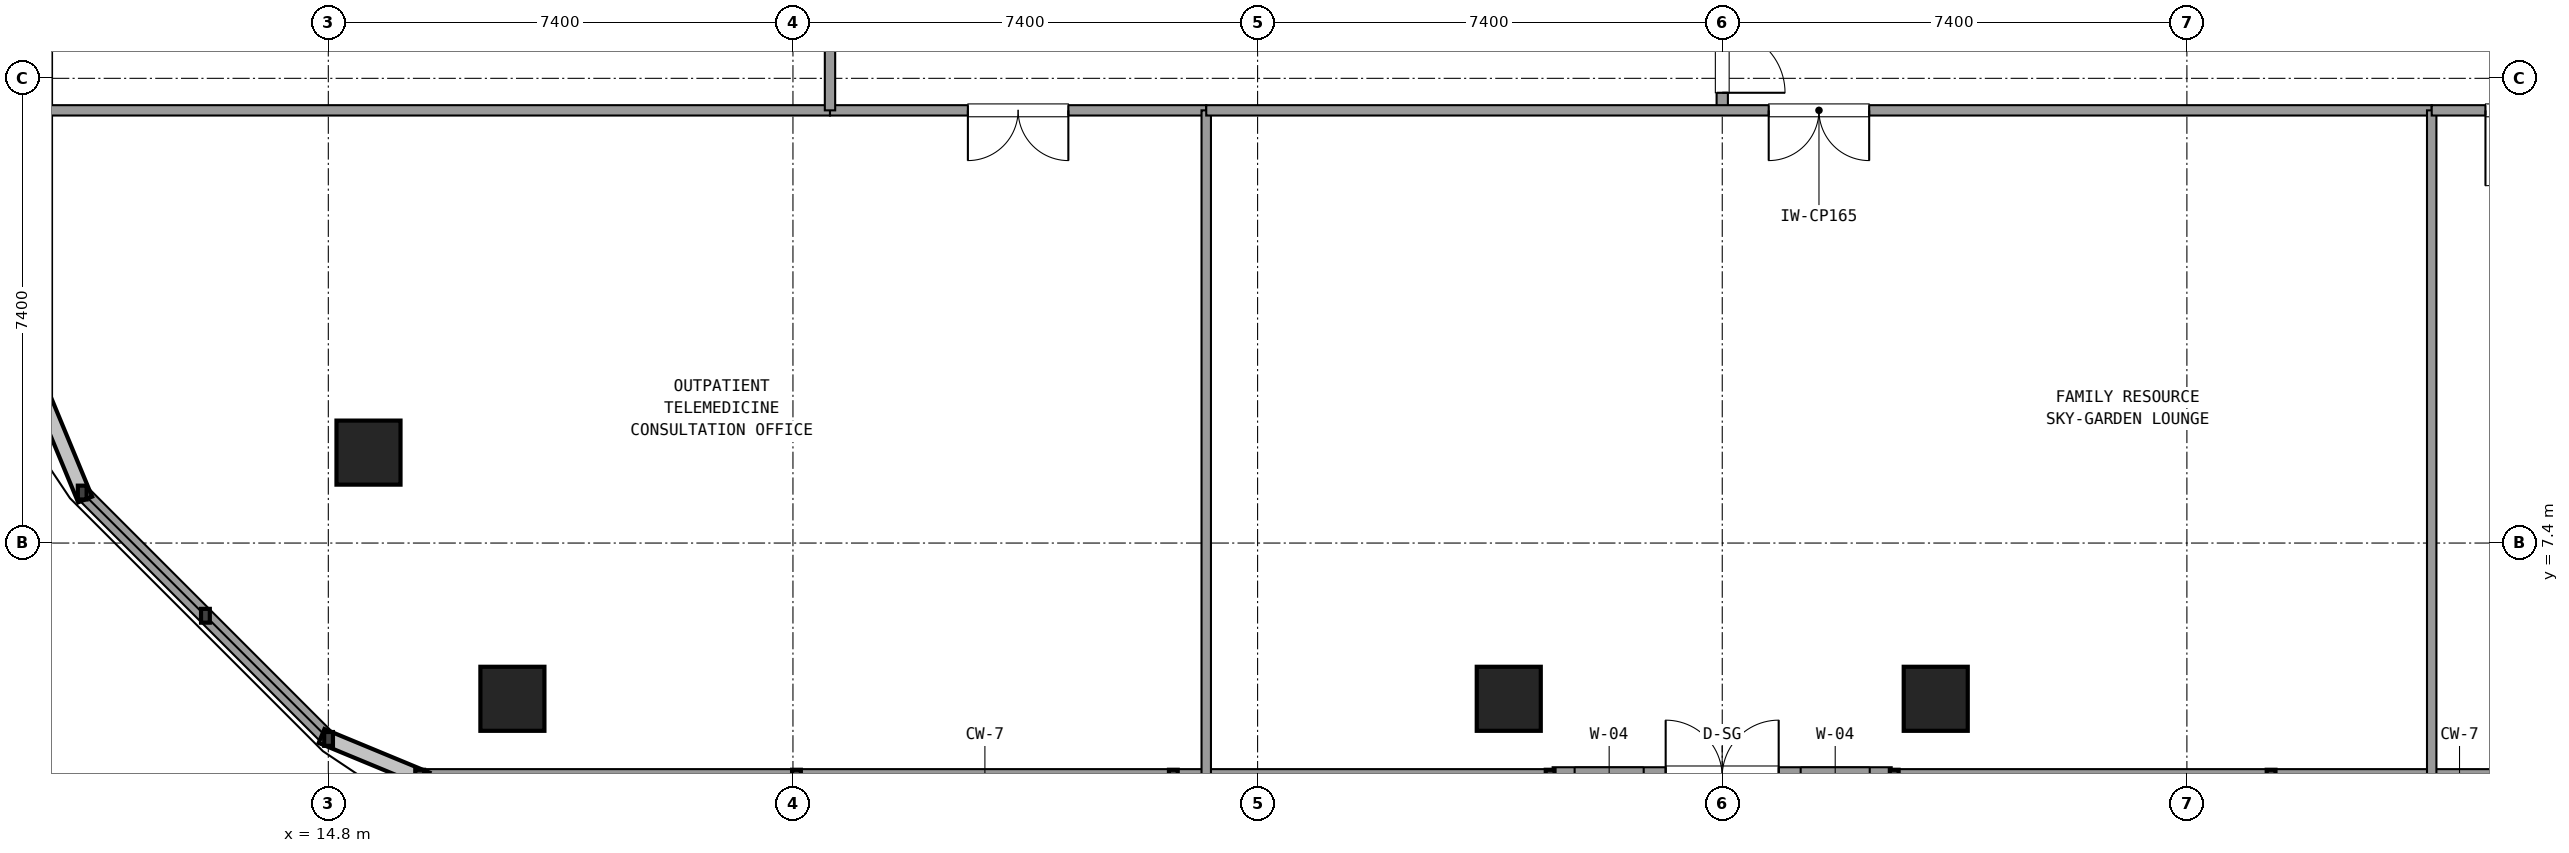
"""IFC4 building model, lengths in metres.
Left out: names, types, materials, properties, quantities, classifications, styles, units other than length and angle.
Written with IfcOpenShell. Run it as: python <this file> out.ifc"""

import sys

from ifc_helpers import new_model, si_unit, direction, frame, frame_2d, origin, origin_2d, place, context, subcontext, project, spatial, rectangle, extrude, element, fill, save


model = new_model("IFC4")
c1 = context("Model", 3, precision=1e-05, world=origin(), true_north=direction((0.0, 1.0)))
c2 = subcontext(c1, "Body", "Model", "MODEL_VIEW")
j1 = project(units=[si_unit("LENGTHUNIT", "METRE"), si_unit("PLANEANGLEUNIT", "RADIAN")], contexts=[c1])
p1 = place(None, origin())
s1 = spatial("IfcSite", under=j1, at=p1, CompositionType="ELEMENT")
p2 = place(p1, origin())
s2 = spatial("IfcBuilding", under=s1, at=p2, CompositionType="ELEMENT")
p3 = place(p2, frame((0.0, 0.0, 75.42)))
s3 = spatial("IfcBuildingStorey", under=s2, at=p3, CompositionType="ELEMENT", Elevation=75.42)
for number, where, z_axis, x_axis in (
    (1, (15.44, 8.84, 0.0), (0.0, 0.0, 1.0), (1.0, 0.0, 0.0)),
    (2, (17.732, 4.92, 0.0), (0.0, 0.0, 1.0), (1.0, 0.0, 0.0)),
    (3, (33.6, 4.92, 0.0), (0.0, 0.0, 1.0), (1.0, 0.0, 0.0)),
    (4, (40.4, 4.92, 0.0), (0.0, 0.0, 1.0), (1.0, 0.0, 0.0)),
):
    element("IfcColumn", number, at=place(p3, frame(where, z_axis=z_axis, x_axis=x_axis)), inside=s3, PredefinedType="COLUMN", context=c2, shape_type="SweptSolid", body=[
        extrude(rectangle(XDim=1.02, YDim=1.02, at=origin_2d()), origin(), (0.0, 0.0, 1.0), 5.76),
    ])
p4 = place(p3, frame((34.299, 3.68, 0.0), z_axis=(0.0, 0.0, 1.0), x_axis=(1.0, 0.0, 0.0)))
e5 = element("IfcWall", 5, at=p4, inside=s3, PredefinedType="SOLIDWALL", context=c2, shape_type="SweptSolid", body=[
    extrude(rectangle(XDim=5.4, YDim=0.3, at=frame_2d((2.7, 0.0))), origin(), (0.0, 0.0, 1.0), 4.83),
])
p5 = place(p4, frame((1.8, 0.0, 0.0)))
e6 = element("IfcOpeningElement", 6, at=p5, cuts=e5, PredefinedType="OPENING", context=c2, shape_type="SweptSolid", body=[
    extrude(rectangle(XDim=1.8, YDim=2.25, at=frame_2d((0.9, 1.125))), frame((0.0, 0.16, 0.0), z_axis=(0.0, -1.0, 0.0), x_axis=(1.0, 0.0, 0.0)), (0.0, 0.0, 1.0), 0.32),
])
p6 = place(p4, frame((0.35, 0.0, 0.4)))
e7 = element("IfcOpeningElement", 7, at=p6, cuts=e5, PredefinedType="OPENING", context=c2, shape_type="SweptSolid", body=[
    extrude(rectangle(XDim=1.1, YDim=1.8, at=frame_2d((0.55, 0.9))), frame((0.0, 0.16, 0.0), z_axis=(0.0, -1.0, 0.0), x_axis=(1.0, 0.0, 0.0)), (0.0, 0.0, 1.0), 0.32),
])
p7 = place(p4, frame((3.95, 0.0, 0.4)))
e8 = element("IfcOpeningElement", 8, at=p7, cuts=e5, PredefinedType="OPENING", context=c2, shape_type="SweptSolid", body=[
    extrude(rectangle(XDim=1.1, YDim=1.8, at=frame_2d((0.55, 0.9))), frame((0.0, 0.16, 0.0), z_axis=(0.0, -1.0, 0.0), x_axis=(1.0, 0.0, 0.0)), (0.0, 0.0, 1.0), 0.32),
])
p8 = place(p3, frame((16.255, 3.68, 0.0), z_axis=(0.0, 0.0, 1.0), x_axis=(1.0, 0.0, 0.0)))
e9 = element("IfcWall", 9, at=p8, inside=s3, PredefinedType="SOLIDWALL", context=c2, shape_type="SweptSolid", body=[
    extrude(rectangle(XDim=18.004, YDim=0.24, at=frame_2d((9.002, 0.0))), origin(), (0.0, 0.0, 1.0), 0.85),
])
p9 = place(p3, frame((39.739, 3.68, 0.0), z_axis=(0.0, 0.0, 1.0), x_axis=(1.0, 0.0, 0.0)))
e10 = element("IfcWall", 10, at=p9, inside=s3, PredefinedType="SOLIDWALL", context=c2, shape_type="SweptSolid", body=[
    extrude(rectangle(XDim=18.006, YDim=0.24, at=frame_2d((9.003, 0.0))), origin(), (0.0, 0.0, 1.0), 0.85),
])
p10 = place(p3, frame((10.28, 23.161, 0.0), z_axis=(0.0, 0.0, 1.0), x_axis=(0.0, -1.0, 0.0)))
e11 = element("IfcWall", 11, at=p10, inside=s3, PredefinedType="SOLIDWALL", context=c2, shape_type="SweptSolid", body=[
    extrude(rectangle(XDim=13.506, YDim=0.24, at=frame_2d((6.753, 0.0))), origin(), (0.0, 0.0, 1.0), 0.85),
])
p11 = place(p3, frame((10.881, 8.204, 0.0), z_axis=(0.0, 0.0, 1.0), x_axis=(0.707084777957, -0.707128783731, 0.0)))
e12 = element("IfcWall", 12, at=p11, inside=s3, PredefinedType="SOLIDWALL", context=c2, shape_type="SweptSolid", body=[
    extrude(rectangle(XDim=5.548, YDim=0.24, at=frame_2d((2.774, 0.0))), origin(), (0.0, 0.0, 1.0), 0.85),
])
p12 = place(p3, frame((37.0, 14.29, 0.0), z_axis=(0.0, 0.0, 1.0), x_axis=(0.0, 1.0, 0.0)))
e13 = element("IfcWall", 13, at=p12, inside=s3, PredefinedType="PARTITIONING", context=c2, shape_type="SweptSolid", body=[
    extrude(rectangle(XDim=2.56, YDim=0.18, at=frame_2d((1.28, 0.0))), origin(), (0.0, 0.0, 1.0), 4.77),
])
p13 = place(p12, frame((0.28, 0.0, 0.0)))
e14 = element("IfcOpeningElement", 14, at=p13, cuts=e13, PredefinedType="OPENING", context=c2, shape_type="SweptSolid", body=[
    extrude(rectangle(XDim=2.0, YDim=2.2, at=frame_2d((1.0, 1.1))), frame((0.0, 0.1, 0.0), z_axis=(0.0, -1.0, 0.0), x_axis=(1.0, 0.0, 0.0)), (0.0, 0.0, 1.0), 0.2),
])
p14 = place(p3, frame((10.3, 14.29, 0.0), z_axis=(0.0, 0.0, 1.0), x_axis=(1.0, 0.0, 0.0)))
e15 = element("IfcWall", 15, at=p14, inside=s3, PredefinedType="PARTITIONING", context=c2, shape_type="SweptSolid", body=[
    extrude(rectangle(XDim=12.49, YDim=0.165, at=frame_2d((6.245, 0.0))), origin(), (0.0, 0.0, 1.0), 4.77),
])
p15 = place(p3, frame((22.79, 14.29, 0.0), z_axis=(0.0, 0.0, 1.0), x_axis=(1.0, 0.0, 0.0)))
e16 = element("IfcWall", 16, at=p15, inside=s3, PredefinedType="PARTITIONING", context=c2, shape_type="SweptSolid", body=[
    extrude(rectangle(XDim=5.992, YDim=0.165, at=frame_2d((2.996, 0.0))), origin(), (0.0, 0.0, 1.0), 4.77),
])
p16 = place(p15, frame((2.196, 0.0, 0.0)))
e17 = element("IfcOpeningElement", 17, at=p16, cuts=e16, PredefinedType="OPENING", context=c2, shape_type="SweptSolid", body=[
    extrude(rectangle(XDim=1.6, YDim=2.2, at=frame_2d((0.8, 1.1))), frame((0.0, 0.093, 0.0), z_axis=(0.0, -1.0, 0.0), x_axis=(1.0, 0.0, 0.0)), (0.0, 0.0, 1.0), 0.185),
])
p17 = place(p3, frame((28.782, 14.29, 0.0), z_axis=(0.0, 0.0, 1.0), x_axis=(0.0, -1.0, 0.0)))
e18 = element("IfcWall", 18, at=p17, inside=s3, PredefinedType="PARTITIONING", context=c2, shape_type="SweptSolid", body=[
    extrude(rectangle(XDim=10.59, YDim=0.15, at=frame_2d((5.295, 0.0))), origin(), (0.0, 0.0, 1.0), 4.77),
])
p18 = place(p3, frame((28.782, 14.29, 0.0), z_axis=(0.0, 0.0, 1.0), x_axis=(1.0, 0.0, 0.0)))
e19 = element("IfcWall", 19, at=p18, inside=s3, PredefinedType="PARTITIONING", context=c2, shape_type="SweptSolid", body=[
    extrude(rectangle(XDim=19.517, YDim=0.165, at=frame_2d((9.759, 0.0))), origin(), (0.0, 0.0, 1.0), 4.77),
])
p19 = place(p18, frame((8.958, 0.0, 0.0)))
e20 = element("IfcOpeningElement", 20, at=p19, cuts=e19, PredefinedType="OPENING", context=c2, shape_type="SweptSolid", body=[
    extrude(rectangle(XDim=1.6, YDim=2.2, at=frame_2d((0.8, 1.1))), frame((0.0, 0.093, 0.0), z_axis=(0.0, -1.0, 0.0), x_axis=(1.0, 0.0, 0.0)), (0.0, 0.0, 1.0), 0.185),
])
p20 = place(p3, frame((48.299, 14.29, 0.0), z_axis=(0.0, 0.0, 1.0), x_axis=(0.0, -1.0, 0.0)))
e21 = element("IfcWall", 21, at=p20, inside=s3, PredefinedType="PARTITIONING", context=c2, shape_type="SweptSolid", body=[
    extrude(rectangle(XDim=10.59, YDim=0.15, at=frame_2d((5.295, 0.0))), origin(), (0.0, 0.0, 1.0), 4.77),
])
p21 = place(p3, frame((48.299, 14.29, 0.0), z_axis=(0.0, 0.0, 1.0), x_axis=(1.0, 0.0, 0.0)))
e22 = element("IfcWall", 22, at=p21, inside=s3, PredefinedType="PARTITIONING", context=c2, shape_type="SweptSolid", body=[
    extrude(rectangle(XDim=2.911, YDim=0.165, at=frame_2d((1.456, 0.0))), origin(), (0.0, 0.0, 1.0), 4.77),
])
p22 = place(p21, frame((0.856, 0.0, 0.0)))
e23 = element("IfcOpeningElement", 23, at=p22, cuts=e22, PredefinedType="OPENING", context=c2, shape_type="SweptSolid", body=[
    extrude(rectangle(XDim=1.2, YDim=2.15, at=frame_2d((0.6, 1.075))), frame((0.0, 0.093, 0.0), z_axis=(0.0, -1.0, 0.0), x_axis=(1.0, 0.0, 0.0)), (0.0, 0.0, 1.0), 0.185),
])
p23 = place(p3, frame((22.79, 14.29, 0.0), z_axis=(0.0, 0.0, 1.0), x_axis=(0.0, 1.0, 0.0)))
e24 = element("IfcWall", 24, at=p23, inside=s3, PredefinedType="PARTITIONING", context=c2, shape_type="SweptSolid", body=[
    extrude(rectangle(XDim=6.966, YDim=0.165, at=frame_2d((3.483, 0.0))), origin(), (0.0, 0.0, 1.0), 4.77),
])
p24 = place(p23, frame((2.683, 0.0, 0.0)))
e25 = element("IfcOpeningElement", 25, at=p24, cuts=e24, PredefinedType="OPENING", context=c2, shape_type="SweptSolid", body=[
    extrude(rectangle(XDim=1.6, YDim=2.2, at=frame_2d((0.8, 1.1))), frame((0.0, 0.093, 0.0), z_axis=(0.0, -1.0, 0.0), x_axis=(1.0, 0.0, 0.0)), (0.0, 0.0, 1.0), 0.185),
])
p25 = place(p13, frame((2.0, 0.0, 0.0), z_axis=(0.0, 0.0, 1.0), x_axis=(-1.0, 0.0, 0.0)))
e26 = element("IfcDoor", 26, at=p25, inside=s3, OperationType="DOUBLE_DOOR_SINGLE_SWING", PredefinedType="DOOR", context=c2, shape_type="SweptSolid", body=[
    extrude(rectangle(XDim=2.0, YDim=2.2, at=frame_2d((1.0, 1.1))), frame((0.0, 0.025, 0.0), z_axis=(0.0, -1.0, 0.0), x_axis=(1.0, 0.0, 0.0)), (0.0, 0.0, 1.0), 0.05),
])
fill(e14, e26)
p26 = place(p16, frame((1.6, 0.0, 0.0), z_axis=(0.0, 0.0, 1.0), x_axis=(-1.0, 0.0, 0.0)))
e27 = element("IfcDoor", 27, at=p26, inside=s3, OperationType="DOUBLE_DOOR_SINGLE_SWING", PredefinedType="DOOR", context=c2, shape_type="SweptSolid", body=[
    extrude(rectangle(XDim=1.6, YDim=2.2, at=frame_2d((0.8, 1.1))), frame((0.0, 0.025, 0.0), z_axis=(0.0, -1.0, 0.0), x_axis=(1.0, 0.0, 0.0)), (0.0, 0.0, 1.0), 0.05),
])
fill(e17, e27)
p27 = place(p19, frame((1.6, 0.0, 0.0), z_axis=(0.0, 0.0, 1.0), x_axis=(-1.0, 0.0, 0.0)))
e28 = element("IfcDoor", 28, at=p27, inside=s3, OperationType="DOUBLE_DOOR_SINGLE_SWING", PredefinedType="DOOR", context=c2, shape_type="SweptSolid", body=[
    extrude(rectangle(XDim=1.6, YDim=2.2, at=frame_2d((0.8, 1.1))), frame((0.0, 0.025, 0.0), z_axis=(0.0, -1.0, 0.0), x_axis=(1.0, 0.0, 0.0)), (0.0, 0.0, 1.0), 0.05),
])
fill(e20, e28)
p28 = place(p22, frame((1.2, 0.0, 0.0), z_axis=(0.0, 0.0, 1.0), x_axis=(-1.0, 0.0, 0.0)))
e29 = element("IfcDoor", 29, at=p28, inside=s3, OperationType="SINGLE_SWING_LEFT", PredefinedType="DOOR", context=c2, shape_type="SweptSolid", body=[
    extrude(rectangle(XDim=1.2, YDim=2.15, at=frame_2d((0.6, 1.075))), frame((0.0, 0.025, 0.0), z_axis=(0.0, -1.0, 0.0), x_axis=(1.0, 0.0, 0.0)), (0.0, 0.0, 1.0), 0.05),
])
fill(e23, e29)
save(model, sys.argv[1])
